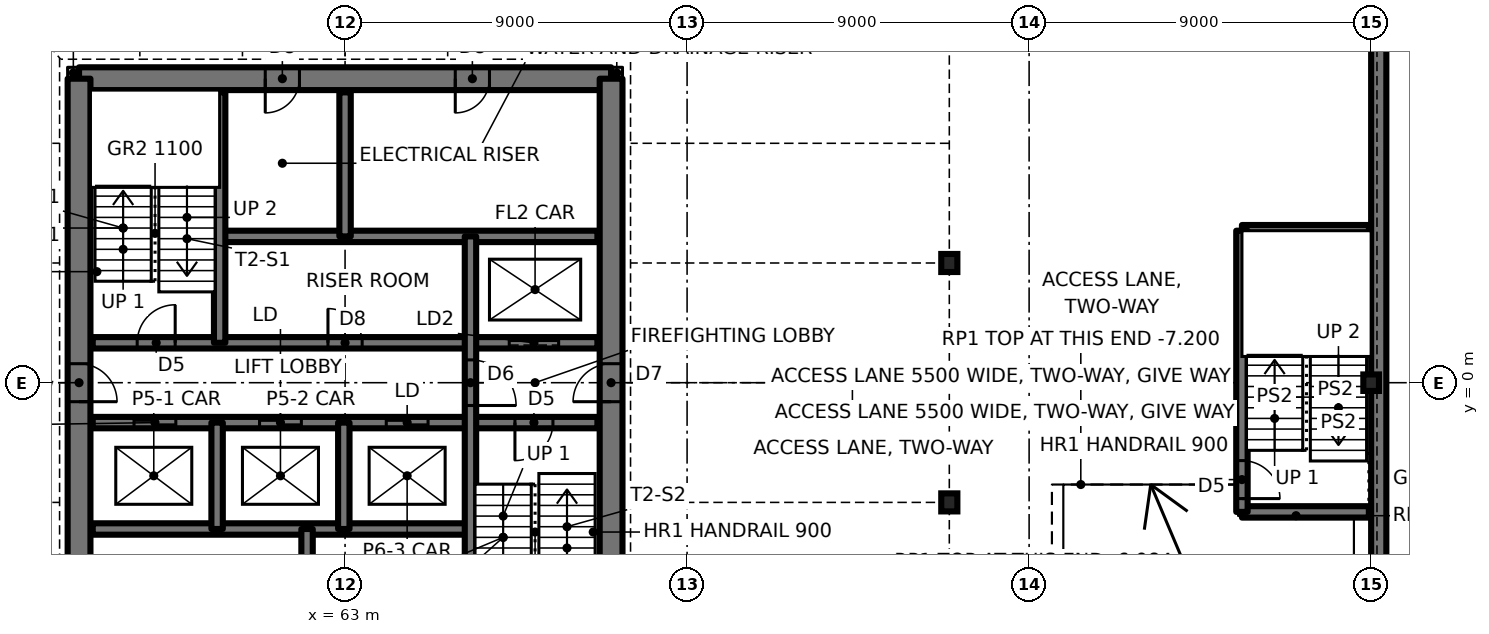
"""IFC4 building model, lengths in metres.
Left out: names, types, materials, properties, quantities, classifications, styles, units other than length and angle.
Written with IfcOpenShell. Run it as: python <this file> out.ifc"""

import sys

from ifc_helpers import new_model, si_unit, direction, frame, frame_2d, origin, origin_2d, place, context, subcontext, project, spatial, rectangle, i_section, extrude, element, fill, save


model = new_model("IFC4")
c1 = context("Model", 3, precision=1e-05, world=origin(), true_north=direction((0.0, 1.0)))
c2 = subcontext(c1, "Body", "Model", "MODEL_VIEW")
j1 = project(units=[si_unit("LENGTHUNIT", "METRE"), si_unit("PLANEANGLEUNIT", "RADIAN")], contexts=[c1])
p1 = place(None, origin())
s1 = spatial("IfcSite", under=j1, at=p1, CompositionType="ELEMENT")
p2 = place(p1, origin())
s2 = spatial("IfcBuilding", under=s1, at=p2, CompositionType="ELEMENT")
p3 = place(p2, frame((0.0, 0.0, -7.2)))
s3 = spatial("IfcBuildingStorey", under=s2, at=p3, CompositionType="ELEMENT", Elevation=-7.2)
for number, where, z_axis, x_axis in (
    (1, (78.9, -3.15, -0.25), (0.0, 0.0, 1.0), (1.0, 0.0, 0.0)),
    (2, (78.9, 3.15, -0.25), (0.0, 0.0, 1.0), (1.0, 0.0, 0.0)),
):
    element("IfcColumn", number, at=place(p3, frame(where, z_axis=z_axis, x_axis=x_axis)), inside=s3, PredefinedType="COLUMN", context=c2, shape_type="SweptSolid", body=[
        extrude(i_section(OverallWidth=0.424, OverallDepth=0.475, WebThickness=0.048, FlangeThickness=0.077, at=origin_2d()), origin(), (0.0, 0.0, 1.0), 3.85),
    ])
p4 = place(p3, frame((90.0, 0.0, -0.25), z_axis=(0.0, 0.0, 1.0), x_axis=(1.0, 0.0, 0.0)))
e3 = element("IfcColumn", 3, at=p4, inside=s3, PredefinedType="COLUMN", context=c2, shape_type="SweptSolid", body=[
    extrude(i_section(OverallWidth=0.411, OverallDepth=0.434, WebThickness=0.036, FlangeThickness=0.057, at=origin_2d()), origin(), (0.0, 0.0, 1.0), 3.85),
])
for number, where, z_axis, x_axis in (
    (4, (70.0, 8.15, -0.25), (0.0, 0.0, 1.0), (1.0, 0.0, 0.0)),
    (5, (55.7, 8.15, -0.25), (0.0, 0.0, 1.0), (1.0, 0.0, 0.0)),
):
    element("IfcWall", number, at=place(p3, frame(where, z_axis=z_axis, x_axis=x_axis)), inside=s3, PredefinedType="SOLIDWALL", context=c2, shape_type="SweptSolid", body=[
        extrude(rectangle(XDim=0.3, YDim=0.3, at=frame_2d((0.15, 0.0))), origin(), (0.0, 0.0, 1.0), 3.85),
    ])
p5 = place(p3, frame((70.0, 8.0, -0.25), z_axis=(0.0, 0.0, 1.0), x_axis=(-1.0, 0.0, 0.0)))
e6 = element("IfcWall", 6, at=p5, inside=s3, PredefinedType="SHEAR", context=c2, shape_type="SweptSolid", body=[
    extrude(rectangle(XDim=14.0, YDim=0.6, at=frame_2d((7.0, 0.0))), origin(), (0.0, 0.0, 1.0), 3.85),
])
p6 = place(p5, frame((8.2, 0.0, 0.25)))
e7 = element("IfcOpeningElement", 7, at=p6, cuts=e6, PredefinedType="OPENING", context=c2, shape_type="SweptSolid", body=[
    extrude(rectangle(XDim=0.9, YDim=2.1, at=frame_2d((0.45, 1.05))), frame((0.0, 0.31, 0.0), z_axis=(0.0, -1.0, 0.0), x_axis=(1.0, 0.0, 0.0)), (0.0, 0.0, 1.0), 0.62),
])
p7 = place(p5, frame((3.2, 0.0, 0.25)))
e8 = element("IfcOpeningElement", 8, at=p7, cuts=e6, PredefinedType="OPENING", context=c2, shape_type="SweptSolid", body=[
    extrude(rectangle(XDim=0.9, YDim=2.1, at=frame_2d((0.45, 1.05))), frame((0.0, 0.31, 0.0), z_axis=(0.0, -1.0, 0.0), x_axis=(1.0, 0.0, 0.0)), (0.0, 0.0, 1.0), 0.62),
])
p8 = place(p3, frame((70.0, -8.0, -0.25), z_axis=(0.0, 0.0, 1.0), x_axis=(0.0, 1.0, 0.0)))
e9 = element("IfcWall", 9, at=p8, inside=s3, PredefinedType="SHEAR", context=c2, shape_type="SweptSolid", body=[
    extrude(rectangle(XDim=16.0, YDim=0.6, at=frame_2d((8.0, 0.0))), origin(), (0.0, 0.0, 1.0), 3.85),
])
p9 = place(p8, frame((7.5, 0.0, 0.25)))
e10 = element("IfcOpeningElement", 10, at=p9, cuts=e9, PredefinedType="OPENING", context=c2, shape_type="SweptSolid", body=[
    extrude(rectangle(XDim=1.0, YDim=2.1, at=frame_2d((0.5, 1.05))), frame((0.0, 0.31, 0.0), z_axis=(0.0, -1.0, 0.0), x_axis=(1.0, 0.0, 0.0)), (0.0, 0.0, 1.0), 0.62),
])
p10 = place(p3, frame((56.0, 8.0, -0.25), z_axis=(0.0, 0.0, 1.0), x_axis=(0.0, -1.0, 0.0)))
e11 = element("IfcWall", 11, at=p10, inside=s3, PredefinedType="SHEAR", context=c2, shape_type="SweptSolid", body=[
    extrude(rectangle(XDim=16.0, YDim=0.6, at=frame_2d((8.0, 0.0))), origin(), (0.0, 0.0, 1.0), 3.85),
])
p11 = place(p10, frame((7.5, 0.0, 0.25)))
e12 = element("IfcOpeningElement", 12, at=p11, cuts=e11, PredefinedType="OPENING", context=c2, shape_type="SweptSolid", body=[
    extrude(rectangle(XDim=1.0, YDim=2.1, at=frame_2d((0.5, 1.05))), frame((0.0, 0.31, 0.0), z_axis=(0.0, -1.0, 0.0), x_axis=(1.0, 0.0, 0.0)), (0.0, 0.0, 1.0), 0.62),
])
p12 = place(p3, frame((90.2, -35.8, 0.0), z_axis=(0.0, 0.0, 1.0), x_axis=(0.0, 1.0, 0.0)))
e13 = element("IfcWall", 13, at=p12, inside=s3, PredefinedType="SOLIDWALL", context=c2, shape_type="SweptSolid", body=[
    extrude(rectangle(XDim=71.6, YDim=0.4, at=frame_2d((35.8, 0.0))), origin(), (0.0, 0.0, 1.0), 3.6),
])
p13 = place(p3, frame((56.36, -3.85, -0.25), z_axis=(0.0, 0.0, 1.0), x_axis=(1.0, 0.0, 0.0)))
e14 = element("IfcWall", 14, at=p13, inside=s3, PredefinedType="SOLIDWALL", context=c2, shape_type="SweptSolid", body=[
    extrude(rectangle(XDim=9.94, YDim=0.3, at=frame_2d((4.97, 0.0))), origin(), (0.0, 0.0, 1.0), 3.85),
])
p14 = place(p3, frame((86.6, -3.4, -0.25), z_axis=(0.0, 0.0, 1.0), x_axis=(1.0, 0.0, 0.0)))
e15 = element("IfcWall", 15, at=p14, inside=s3, PredefinedType="SOLIDWALL", context=c2, shape_type="SweptSolid", body=[
    extrude(rectangle(XDim=3.34, YDim=0.3, at=frame_2d((1.67, 0.0))), origin(), (0.0, 0.0, 1.0), 3.85),
])
p15 = place(p3, frame((56.36, -1.05, -0.25), z_axis=(0.0, 0.0, 1.0), x_axis=(1.0, 0.0, 0.0)))
e16 = element("IfcWall", 16, at=p15, inside=s3, PredefinedType="SOLIDWALL", context=c2, shape_type="SweptSolid", body=[
    extrude(rectangle(XDim=13.28, YDim=0.3, at=frame_2d((6.64, 0.0))), origin(), (0.0, 0.0, 1.0), 3.85),
])
p16 = place(p15, frame((11.11, 0.0, 0.25)))
e17 = element("IfcOpeningElement", 17, at=p16, cuts=e16, PredefinedType="OPENING", context=c2, shape_type="SweptSolid", body=[
    extrude(rectangle(XDim=1.0, YDim=2.1, at=frame_2d((0.5, 1.05))), frame((0.0, 0.16, 0.0), z_axis=(0.0, -1.0, 0.0), x_axis=(1.0, 0.0, 0.0)), (0.0, 0.0, 1.0), 0.32),
])
p17 = place(p15, frame((1.087, 0.0, 0.25)))
e18 = element("IfcOpeningElement", 18, at=p17, cuts=e16, PredefinedType="OPENING", context=c2, shape_type="SweptSolid", body=[
    extrude(rectangle(XDim=1.1, YDim=2.1, at=frame_2d((0.55, 1.05))), frame((0.0, 0.16, 0.0), z_axis=(0.0, -1.0, 0.0), x_axis=(1.0, 0.0, 0.0)), (0.0, 0.0, 1.0), 0.32),
])
p18 = place(p15, frame((4.39, 0.0, 0.25)))
e19 = element("IfcOpeningElement", 19, at=p18, cuts=e16, PredefinedType="OPENING", context=c2, shape_type="SweptSolid", body=[
    extrude(rectangle(XDim=1.1, YDim=2.1, at=frame_2d((0.55, 1.05))), frame((0.0, 0.16, 0.0), z_axis=(0.0, -1.0, 0.0), x_axis=(1.0, 0.0, 0.0)), (0.0, 0.0, 1.0), 0.32),
])
p19 = place(p15, frame((7.724, 0.0, 0.25)))
e20 = element("IfcOpeningElement", 20, at=p19, cuts=e16, PredefinedType="OPENING", context=c2, shape_type="SweptSolid", body=[
    extrude(rectangle(XDim=1.1, YDim=2.1, at=frame_2d((0.55, 1.05))), frame((0.0, 0.16, 0.0), z_axis=(0.0, -1.0, 0.0), x_axis=(1.0, 0.0, 0.0)), (0.0, 0.0, 1.0), 0.32),
])
p20 = place(p3, frame((56.36, 1.05, -0.25), z_axis=(0.0, 0.0, 1.0), x_axis=(1.0, 0.0, 0.0)))
e21 = element("IfcWall", 21, at=p20, inside=s3, PredefinedType="SOLIDWALL", context=c2, shape_type="SweptSolid", body=[
    extrude(rectangle(XDim=13.28, YDim=0.3, at=frame_2d((6.64, 0.0))), origin(), (0.0, 0.0, 1.0), 3.85),
])
p21 = place(p20, frame((1.17, 0.0, 0.25)))
e22 = element("IfcOpeningElement", 22, at=p21, cuts=e21, PredefinedType="OPENING", context=c2, shape_type="SweptSolid", body=[
    extrude(rectangle(XDim=1.0, YDim=2.1, at=frame_2d((0.5, 1.05))), frame((0.0, 0.16, 0.0), z_axis=(0.0, -1.0, 0.0), x_axis=(1.0, 0.0, 0.0)), (0.0, 0.0, 1.0), 0.32),
])
p22 = place(p20, frame((6.19, 0.0, 0.25)))
e23 = element("IfcOpeningElement", 23, at=p22, cuts=e21, PredefinedType="OPENING", context=c2, shape_type="SweptSolid", body=[
    extrude(rectangle(XDim=0.9, YDim=2.1, at=frame_2d((0.45, 1.05))), frame((0.0, 0.16, 0.0), z_axis=(0.0, -1.0, 0.0), x_axis=(1.0, 0.0, 0.0)), (0.0, 0.0, 1.0), 0.32),
])
p23 = place(p20, frame((10.96, 0.0, 0.25)))
e24 = element("IfcOpeningElement", 24, at=p23, cuts=e21, PredefinedType="OPENING", context=c2, shape_type="SweptSolid", body=[
    extrude(rectangle(XDim=1.3, YDim=2.1, at=frame_2d((0.65, 1.05))), frame((0.0, 0.16, 0.0), z_axis=(0.0, -1.0, 0.0), x_axis=(1.0, 0.0, 0.0)), (0.0, 0.0, 1.0), 0.32),
])
p24 = place(p3, frame((59.7, 3.85, -0.25), z_axis=(0.0, 0.0, 1.0), x_axis=(1.0, 0.0, 0.0)))
e25 = element("IfcWall", 25, at=p24, inside=s3, PredefinedType="SOLIDWALL", context=c2, shape_type="SweptSolid", body=[
    extrude(rectangle(XDim=9.94, YDim=0.3, at=frame_2d((4.97, 0.0))), origin(), (0.0, 0.0, 1.0), 3.85),
])
p25 = place(p3, frame((86.6, 4.0, -0.25), z_axis=(0.0, 0.0, 1.0), x_axis=(1.0, 0.0, 0.0)))
e26 = element("IfcWall", 26, at=p25, inside=s3, PredefinedType="SOLIDWALL", context=c2, shape_type="SweptSolid", body=[
    extrude(rectangle(XDim=3.34, YDim=0.3, at=frame_2d((1.67, 0.0))), origin(), (0.0, 0.0, 1.0), 3.85),
])
p26 = place(p3, frame((86.6, -3.4, -0.25), z_axis=(0.0, 0.0, 1.0), x_axis=(0.0, 1.0, 0.0)))
e27 = element("IfcWall", 27, at=p26, inside=s3, PredefinedType="SOLIDWALL", context=c2, shape_type="SweptSolid", body=[
    extrude(rectangle(XDim=7.4, YDim=0.3, at=frame_2d((3.7, 0.0))), origin(), (0.0, 0.0, 1.0), 3.85),
])
p27 = place(p26, frame((0.35, 0.0, 0.25)))
e28 = element("IfcOpeningElement", 28, at=p27, cuts=e27, PredefinedType="OPENING", context=c2, shape_type="SweptSolid", body=[
    extrude(rectangle(XDim=1.0, YDim=2.1, at=frame_2d((0.5, 1.05))), frame((0.0, 0.16, 0.0), z_axis=(0.0, -1.0, 0.0), x_axis=(1.0, 0.0, 0.0)), (0.0, 0.0, 1.0), 0.32),
])
p28 = place(p3, frame((66.3, -7.64, -0.25), z_axis=(0.0, 0.0, 1.0), x_axis=(0.0, 1.0, 0.0)))
e29 = element("IfcWall", 29, at=p28, inside=s3, PredefinedType="SOLIDWALL", context=c2, shape_type="SweptSolid", body=[
    extrude(rectangle(XDim=11.49, YDim=0.3, at=frame_2d((5.745, 0.0))), origin(), (0.0, 0.0, 1.0), 3.85),
])
p29 = place(p28, frame((7.04, 0.0, 0.25)))
e30 = element("IfcOpeningElement", 30, at=p29, cuts=e29, PredefinedType="OPENING", context=c2, shape_type="SweptSolid", body=[
    extrude(rectangle(XDim=1.2, YDim=2.1, at=frame_2d((0.6, 1.05))), frame((0.0, 0.16, 0.0), z_axis=(0.0, -1.0, 0.0), x_axis=(1.0, 0.0, 0.0)), (0.0, 0.0, 1.0), 0.32),
])
p30 = place(p3, frame((63.0, 3.85, -0.25), z_axis=(0.0, 0.0, 1.0), x_axis=(0.0, 1.0, 0.0)))
e31 = element("IfcWall", 31, at=p30, inside=s3, PredefinedType="SOLIDWALL", context=c2, shape_type="SweptSolid", body=[
    extrude(rectangle(XDim=3.79, YDim=0.3, at=frame_2d((1.895, 0.0))), origin(), (0.0, 0.0, 1.0), 3.85),
])
p31 = place(p3, frame((62.967, -3.85, -0.25), z_axis=(0.0, 0.0, 1.0), x_axis=(0.0, 1.0, 0.0)))
e32 = element("IfcWall", 32, at=p31, inside=s3, PredefinedType="SOLIDWALL", context=c2, shape_type="SweptSolid", body=[
    extrude(rectangle(XDim=2.8, YDim=0.3, at=frame_2d((1.4, 0.0))), origin(), (0.0, 0.0, 1.0), 3.85),
])
p32 = place(p3, frame((62.0, -7.64, -0.25), z_axis=(0.0, 0.0, 1.0), x_axis=(0.0, 1.0, 0.0)))
e33 = element("IfcWall", 33, at=p32, inside=s3, PredefinedType="SOLIDWALL", context=c2, shape_type="SweptSolid", body=[
    extrude(rectangle(XDim=3.79, YDim=0.3, at=frame_2d((1.895, 0.0))), origin(), (0.0, 0.0, 1.0), 3.85),
])
p33 = place(p3, frame((59.7, 1.05, -0.25), z_axis=(0.0, 0.0, 1.0), x_axis=(0.0, 1.0, 0.0)))
e34 = element("IfcWall", 34, at=p33, inside=s3, PredefinedType="SOLIDWALL", context=c2, shape_type="SweptSolid", body=[
    extrude(rectangle(XDim=6.59, YDim=0.3, at=frame_2d((3.295, 0.0))), origin(), (0.0, 0.0, 1.0), 3.85),
])
p34 = place(p3, frame((59.633, -3.85, -0.25), z_axis=(0.0, 0.0, 1.0), x_axis=(0.0, 1.0, 0.0)))
e35 = element("IfcWall", 35, at=p34, inside=s3, PredefinedType="SOLIDWALL", context=c2, shape_type="SweptSolid", body=[
    extrude(rectangle(XDim=2.8, YDim=0.3, at=frame_2d((1.4, 0.0))), origin(), (0.0, 0.0, 1.0), 3.85),
])
p35 = place(p21, origin())
e36 = element("IfcDoor", 36, at=p35, inside=s3, OperationType="SINGLE_SWING_RIGHT", PredefinedType="DOOR", context=c2, shape_type="SweptSolid", body=[
    extrude(rectangle(XDim=1.0, YDim=2.1, at=frame_2d((0.5, 1.05))), frame((0.0, 0.025, 0.0), z_axis=(0.0, -1.0, 0.0), x_axis=(1.0, 0.0, 0.0)), (0.0, 0.0, 1.0), 0.05),
])
fill(e22, e36)
p36 = place(p16, frame((1.0, 0.0, 0.0), z_axis=(0.0, 0.0, 1.0), x_axis=(-1.0, 0.0, 0.0)))
e37 = element("IfcDoor", 37, at=p36, inside=s3, OperationType="SINGLE_SWING_RIGHT", PredefinedType="DOOR", context=c2, shape_type="SweptSolid", body=[
    extrude(rectangle(XDim=1.0, YDim=2.1, at=frame_2d((0.5, 1.05))), frame((0.0, 0.025, 0.0), z_axis=(0.0, -1.0, 0.0), x_axis=(1.0, 0.0, 0.0)), (0.0, 0.0, 1.0), 0.05),
])
fill(e17, e37)
p37 = place(p29, frame((1.2, 0.0, 0.0), z_axis=(0.0, 0.0, 1.0), x_axis=(-1.0, 0.0, 0.0)))
e38 = element("IfcDoor", 38, at=p37, inside=s3, OperationType="SINGLE_SWING_RIGHT", PredefinedType="DOOR", context=c2, shape_type="SweptSolid", body=[
    extrude(rectangle(XDim=1.2, YDim=2.1, at=frame_2d((0.6, 1.05))), frame((0.0, 0.025, 0.0), z_axis=(0.0, -1.0, 0.0), x_axis=(1.0, 0.0, 0.0)), (0.0, 0.0, 1.0), 0.05),
])
fill(e30, e38)
p38 = place(p22, origin())
e39 = element("IfcDoor", 39, at=p38, inside=s3, OperationType="SINGLE_SWING_LEFT", PredefinedType="DOOR", context=c2, shape_type="SweptSolid", body=[
    extrude(rectangle(XDim=0.9, YDim=2.1, at=frame_2d((0.45, 1.05))), frame((0.0, 0.025, 0.0), z_axis=(0.0, -1.0, 0.0), x_axis=(1.0, 0.0, 0.0)), (0.0, 0.0, 1.0), 0.05),
])
fill(e23, e39)
p39 = place(p27, frame((1.0, 0.0, 0.0), z_axis=(0.0, 0.0, 1.0), x_axis=(-1.0, 0.0, 0.0)))
e40 = element("IfcDoor", 40, at=p39, inside=s3, OperationType="SINGLE_SWING_RIGHT", PredefinedType="DOOR", context=c2, shape_type="SweptSolid", body=[
    extrude(rectangle(XDim=1.0, YDim=2.1, at=frame_2d((0.5, 1.05))), frame((0.0, 0.025, 0.0), z_axis=(0.0, -1.0, 0.0), x_axis=(1.0, 0.0, 0.0)), (0.0, 0.0, 1.0), 0.05),
])
fill(e28, e40)
p40 = place(p11, origin())
e41 = element("IfcDoor", 41, at=p40, inside=s3, OperationType="SINGLE_SWING_RIGHT", PredefinedType="DOOR", context=c2, shape_type="SweptSolid", body=[
    extrude(rectangle(XDim=1.0, YDim=2.1, at=frame_2d((0.5, 1.05))), frame((0.0, 0.025, 0.0), z_axis=(0.0, -1.0, 0.0), x_axis=(1.0, 0.0, 0.0)), (0.0, 0.0, 1.0), 0.05),
])
fill(e12, e41)
p41 = place(p9, origin())
e42 = element("IfcDoor", 42, at=p41, inside=s3, OperationType="SINGLE_SWING_LEFT", PredefinedType="DOOR", context=c2, shape_type="SweptSolid", body=[
    extrude(rectangle(XDim=1.0, YDim=2.1, at=frame_2d((0.5, 1.05))), frame((0.0, 0.025, 0.0), z_axis=(0.0, -1.0, 0.0), x_axis=(1.0, 0.0, 0.0)), (0.0, 0.0, 1.0), 0.05),
])
fill(e10, e42)
p42 = place(p6, origin())
e43 = element("IfcDoor", 43, at=p42, inside=s3, OperationType="SINGLE_SWING_RIGHT", PredefinedType="DOOR", context=c2, shape_type="SweptSolid", body=[
    extrude(rectangle(XDim=0.9, YDim=2.1, at=frame_2d((0.45, 1.05))), frame((0.0, 0.025, 0.0), z_axis=(0.0, -1.0, 0.0), x_axis=(1.0, 0.0, 0.0)), (0.0, 0.0, 1.0), 0.05),
])
fill(e7, e43)
p43 = place(p7, origin())
e44 = element("IfcDoor", 44, at=p43, inside=s3, OperationType="SINGLE_SWING_RIGHT", PredefinedType="DOOR", context=c2, shape_type="SweptSolid", body=[
    extrude(rectangle(XDim=0.9, YDim=2.1, at=frame_2d((0.45, 1.05))), frame((0.0, 0.025, 0.0), z_axis=(0.0, -1.0, 0.0), x_axis=(1.0, 0.0, 0.0)), (0.0, 0.0, 1.0), 0.05),
])
fill(e8, e44)
p44 = place(p17, origin())
e45 = element("IfcDoor", 45, at=p44, inside=s3, OperationType="DOUBLE_DOOR_SLIDING", PredefinedType="DOOR", context=c2, shape_type="SweptSolid", body=[
    extrude(rectangle(XDim=1.1, YDim=2.1, at=frame_2d((0.55, 1.05))), frame((0.0, 0.025, 0.0), z_axis=(0.0, -1.0, 0.0), x_axis=(1.0, 0.0, 0.0)), (0.0, 0.0, 1.0), 0.05),
])
fill(e18, e45)
p45 = place(p18, origin())
e46 = element("IfcDoor", 46, at=p45, inside=s3, OperationType="DOUBLE_DOOR_SLIDING", PredefinedType="DOOR", context=c2, shape_type="SweptSolid", body=[
    extrude(rectangle(XDim=1.1, YDim=2.1, at=frame_2d((0.55, 1.05))), frame((0.0, 0.025, 0.0), z_axis=(0.0, -1.0, 0.0), x_axis=(1.0, 0.0, 0.0)), (0.0, 0.0, 1.0), 0.05),
])
fill(e19, e46)
p46 = place(p19, origin())
e47 = element("IfcDoor", 47, at=p46, inside=s3, OperationType="DOUBLE_DOOR_SLIDING", PredefinedType="DOOR", context=c2, shape_type="SweptSolid", body=[
    extrude(rectangle(XDim=1.1, YDim=2.1, at=frame_2d((0.55, 1.05))), frame((0.0, 0.025, 0.0), z_axis=(0.0, -1.0, 0.0), x_axis=(1.0, 0.0, 0.0)), (0.0, 0.0, 1.0), 0.05),
])
fill(e20, e47)
p47 = place(p23, origin())
e48 = element("IfcDoor", 48, at=p47, inside=s3, OperationType="SLIDING_TO_LEFT", PredefinedType="DOOR", context=c2, shape_type="SweptSolid", body=[
    extrude(rectangle(XDim=1.3, YDim=2.1, at=frame_2d((0.65, 1.05))), frame((0.0, 0.025, 0.0), z_axis=(0.0, -1.0, 0.0), x_axis=(1.0, 0.0, 0.0)), (0.0, 0.0, 1.0), 0.05),
])
fill(e24, e48)
save(model, sys.argv[1])
